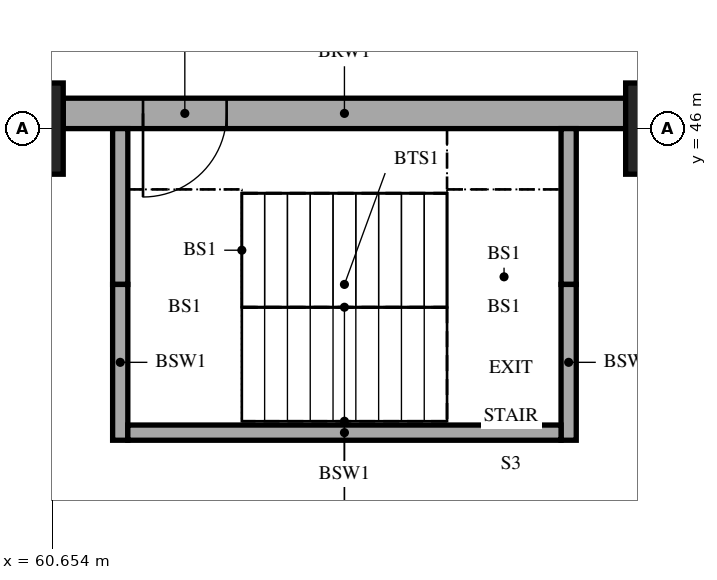
"""IFC4 building model, lengths in metres.
Left out: names, types, materials, properties, quantities, classifications, styles, units other than length and angle.
Written with IfcOpenShell. Run it as: python <this file> out.ifc"""

import sys

from ifc_helpers import new_model, si_unit, direction, frame, frame_2d, origin, origin_2d, place, context, subcontext, project, spatial, rectangle, extrude, element, fill, save


model = new_model("IFC4")
c1 = context("Model", 3, precision=1e-05, world=origin(), true_north=direction((0.0, 1.0)))
c2 = subcontext(c1, "Body", "Model", "MODEL_VIEW")
j1 = project(units=[si_unit("LENGTHUNIT", "METRE"), si_unit("PLANEANGLEUNIT", "RADIAN")], contexts=[c1])
p1 = place(None, origin())
s1 = spatial("IfcSite", under=j1, at=p1, CompositionType="ELEMENT")
p2 = place(p1, origin())
s2 = spatial("IfcBuilding", under=s1, at=p2, CompositionType="ELEMENT")
p3 = place(p2, frame((0.0, 0.0, -8.4)))
s3 = spatial("IfcBuildingStorey", under=s2, at=p3, CompositionType="ELEMENT", Elevation=-8.4)
for number, where, z_axis, x_axis in (
    (1, (60.0, 46.0, 0.0), (0.0, 0.0, 1.0), (1.0, 0.0, 0.0)),
    (2, (69.0, 46.0, 0.0), (0.0, 0.0, 1.0), (1.0, 0.0, 0.0)),
):
    element("IfcColumn", number, at=place(p3, frame(where, z_axis=z_axis, x_axis=x_axis)), inside=s3, PredefinedType="COLUMN", context=c2, shape_type="SweptSolid", body=[
        extrude(rectangle(XDim=1.6, YDim=1.2, at=origin_2d()), origin(), (0.0, 0.0, 1.0), 4.2),
    ])
p4 = place(p3, frame((60.8, 46.2, 0.0), z_axis=(0.0, 0.0, 1.0), x_axis=(1.0, 0.0, 0.0)))
e3 = element("IfcWall", 3, at=p4, inside=s3, PredefinedType="SOLIDWALL", context=c2, shape_type="SweptSolid", body=[
    extrude(rectangle(XDim=7.4, YDim=0.4, at=frame_2d((3.7, 0.0))), origin(), (0.0, 0.0, 1.0), 4.2),
])
p5 = place(p4, frame((1.05, 0.0, 0.0)))
e4 = element("IfcOpeningElement", 4, at=p5, cuts=e3, PredefinedType="OPENING", context=c2, shape_type="SweptSolid", body=[
    extrude(rectangle(XDim=1.1, YDim=2.1, at=frame_2d((0.55, 1.05))), frame((0.0, 0.21, 0.0), z_axis=(0.0, -1.0, 0.0), x_axis=(1.0, 0.0, 0.0)), (0.0, 0.0, 1.0), 0.42),
])
for number, where, z_axis, x_axis in (
    (5, (61.55, 46.0, 0.0), (0.0, 0.0, 1.0), (0.0, -1.0, 0.0)),
    (6, (61.55, 43.95, 0.0), (0.0, 0.0, 1.0), (0.0, -1.0, 0.0)),
    (7, (67.45, 46.0, 0.0), (0.0, 0.0, 1.0), (0.0, -1.0, 0.0)),
    (8, (67.45, 43.95, 0.0), (0.0, 0.0, 1.0), (0.0, -1.0, 0.0)),
):
    element("IfcWall", number, at=place(p3, frame(where, z_axis=z_axis, x_axis=x_axis)), inside=s3, PredefinedType="SOLIDWALL", context=c2, shape_type="SweptSolid", body=[
        extrude(rectangle(XDim=2.05, YDim=0.2, at=frame_2d((1.025, 0.0))), origin(), (0.0, 0.0, 1.0), 4.2),
    ])
p6 = place(p3, frame((61.65, 42.0, 0.0), z_axis=(0.0, 0.0, 1.0), x_axis=(1.0, 0.0, 0.0)))
e9 = element("IfcWall", 9, at=p6, inside=s3, PredefinedType="SOLIDWALL", context=c2, shape_type="SweptSolid", body=[
    extrude(rectangle(XDim=5.7, YDim=0.2, at=frame_2d((2.85, 0.0))), origin(), (0.0, 0.0, 1.0), 4.2),
])
p7 = place(p5, frame((1.1, 0.0, 0.0), z_axis=(0.0, 0.0, 1.0), x_axis=(-1.0, 0.0, 0.0)))
e10 = element("IfcDoor", 10, at=p7, inside=s3, OperationType="SINGLE_SWING_RIGHT", PredefinedType="DOOR", context=c2, shape_type="SweptSolid", body=[
    extrude(rectangle(XDim=1.1, YDim=2.1, at=frame_2d((0.55, 1.05))), frame((0.0, 0.025, 0.0), z_axis=(0.0, -1.0, 0.0), x_axis=(1.0, 0.0, 0.0)), (0.0, 0.0, 1.0), 0.05),
])
fill(e4, e10)
save(model, sys.argv[1])
